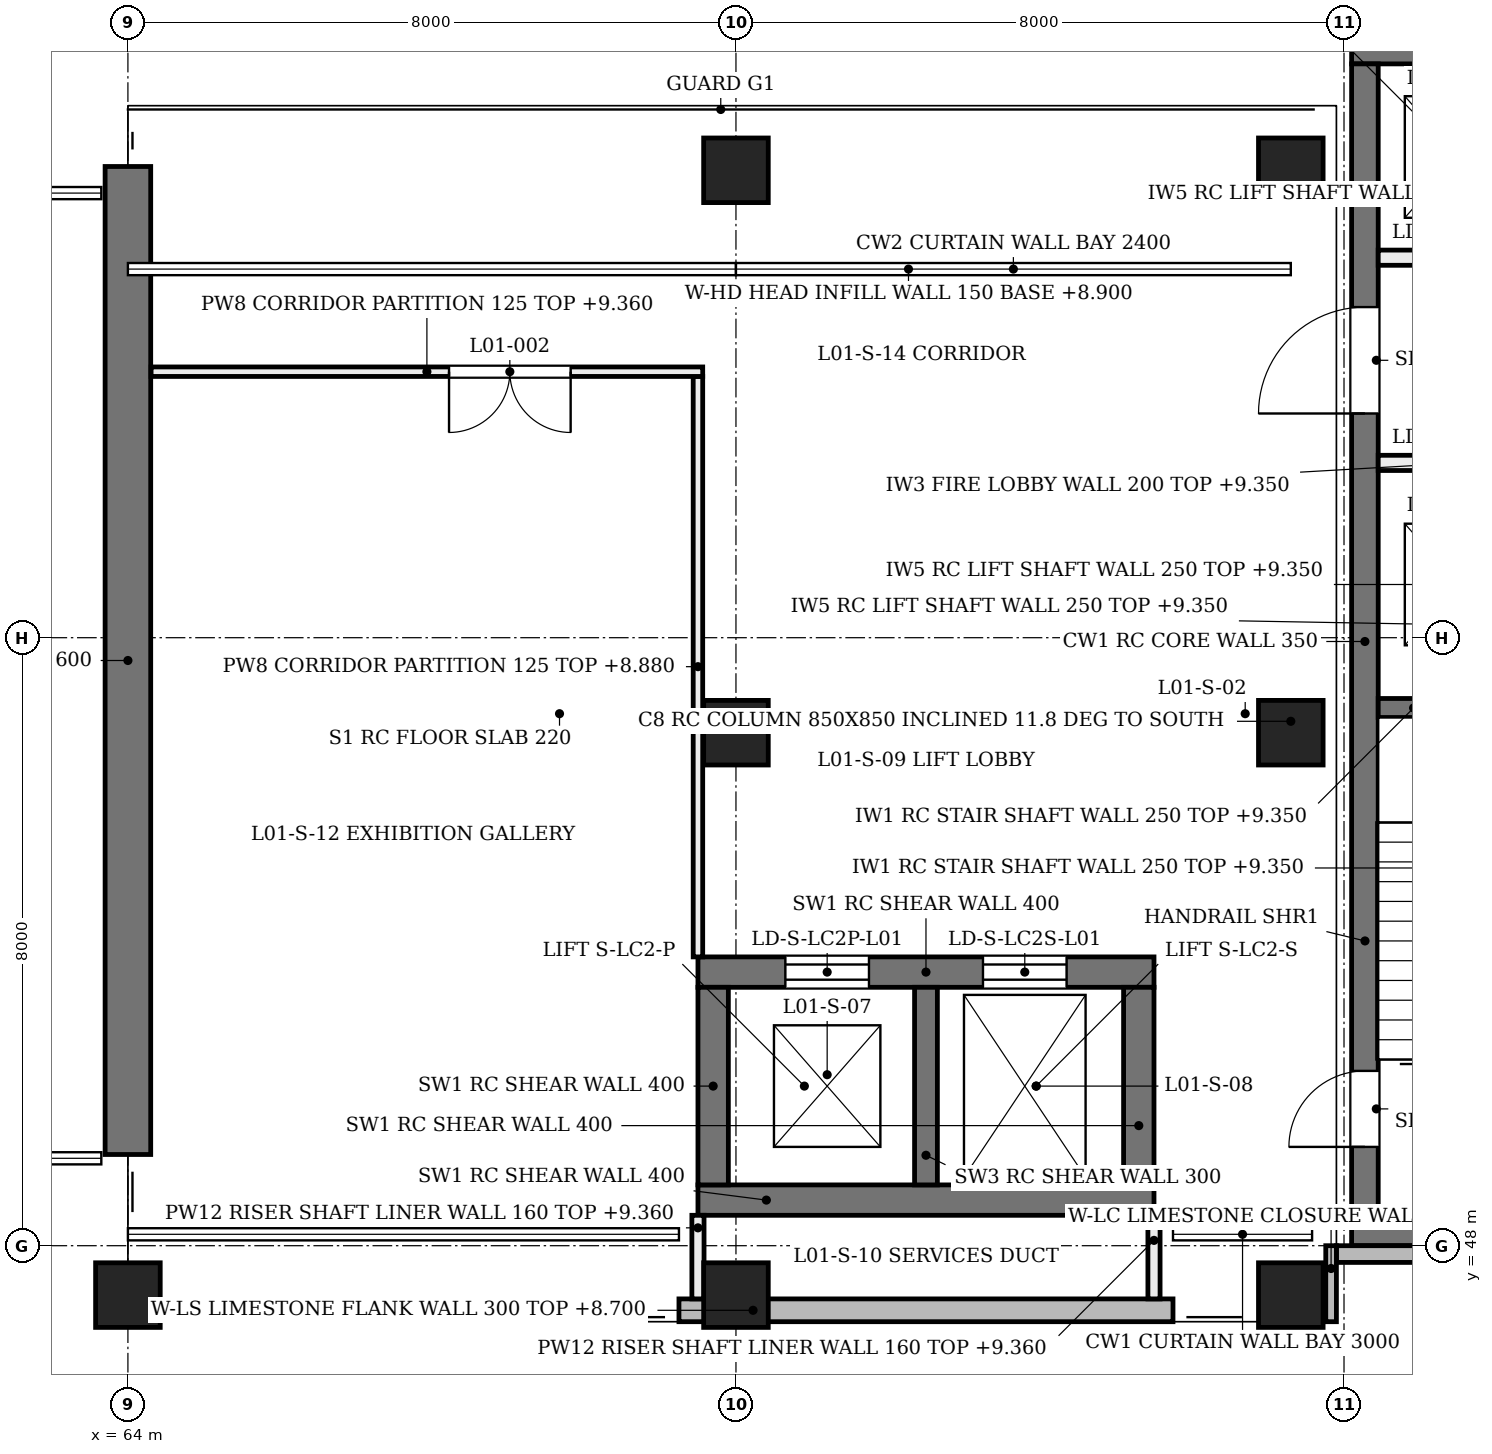
"""IFC4 building model, lengths in metres.
Left out: names, types, materials, properties, quantities, classifications, styles, units other than length and angle.
Written with IfcOpenShell. Run it as: python <this file> out.ifc"""

import sys

from ifc_helpers import new_model, si_unit, direction, frame, frame_2d, origin, origin_2d, place, context, subcontext, project, spatial, rectangle, extrude, element, fill, save


model = new_model("IFC4")
c1 = context("Model", 3, precision=1e-05, world=origin(), true_north=direction((0.0, 1.0)))
c2 = subcontext(c1, "Body", "Model", "MODEL_VIEW")
j1 = project(units=[si_unit("LENGTHUNIT", "METRE"), si_unit("PLANEANGLEUNIT", "RADIAN")], contexts=[c1])
p1 = place(None, origin())
s1 = spatial("IfcSite", under=j1, at=p1, CompositionType="ELEMENT")
p2 = place(p1, origin())
s2 = spatial("IfcBuilding", under=s1, at=p2, CompositionType="ELEMENT")
p3 = place(p2, frame((0.0, 0.0, 4.8)))
s3 = spatial("IfcBuildingStorey", under=s2, at=p3, CompositionType="ELEMENT", Elevation=4.8)
p4 = place(p3, frame((71.5, 48.6, 0.0), z_axis=(0.0, 0.0, 1.0), x_axis=(1.0, 0.0, 0.0)))
e1 = element("IfcWall", 1, at=p4, inside=s3, PredefinedType="SHEAR", context=c2, shape_type="SweptSolid", body=[
    extrude(rectangle(XDim=6.0, YDim=0.4, at=frame_2d((3.0, 0.0))), origin(), (0.0, 0.0, 1.0), 4.58),
])
p5 = place(p3, frame((71.5, 51.6, 0.0), z_axis=(0.0, 0.0, 1.0), x_axis=(1.0, 0.0, 0.0)))
e2 = element("IfcWall", 2, at=p5, inside=s3, PredefinedType="SHEAR", context=c2, shape_type="SweptSolid", body=[
    extrude(rectangle(XDim=6.0, YDim=0.4, at=frame_2d((3.0, 0.0))), origin(), (0.0, 0.0, 1.0), 4.58),
])
p6 = place(p5, frame((1.15, 0.0, 0.0)))
e3 = element("IfcOpeningElement", 3, at=p6, cuts=e2, PredefinedType="OPENING", context=c2, shape_type="SweptSolid", body=[
    extrude(rectangle(XDim=1.1, YDim=2.1, at=frame_2d((0.55, 1.05))), frame((0.0, 0.21, 0.0), z_axis=(0.0, -1.0, 0.0), x_axis=(1.0, 0.0, 0.0)), (0.0, 0.0, 1.0), 0.42),
])
p7 = place(p5, frame((3.75, 0.0, 0.0)))
e4 = element("IfcOpeningElement", 4, at=p7, cuts=e2, PredefinedType="OPENING", context=c2, shape_type="SweptSolid", body=[
    extrude(rectangle(XDim=1.1, YDim=2.1, at=frame_2d((0.55, 1.05))), frame((0.0, 0.21, 0.0), z_axis=(0.0, -1.0, 0.0), x_axis=(1.0, 0.0, 0.0)), (0.0, 0.0, 1.0), 0.42),
])
for number, where, z_axis, x_axis in (
    (5, (71.7, 48.8, 0.0), (0.0, 0.0, 1.0), (0.0, 1.0, 0.0)),
    (6, (77.3, 48.8, 0.0), (0.0, 0.0, 1.0), (0.0, 1.0, 0.0)),
):
    element("IfcWall", number, at=place(p3, frame(where, z_axis=z_axis, x_axis=x_axis)), inside=s3, PredefinedType="SHEAR", context=c2, shape_type="SweptSolid", body=[
        extrude(rectangle(XDim=2.6, YDim=0.4, at=frame_2d((1.3, 0.0))), origin(), (0.0, 0.0, 1.0), 4.58),
    ])
p8 = place(p3, frame((74.5, 48.8, 0.0), z_axis=(0.0, 0.0, 1.0), x_axis=(0.0, 1.0, 0.0)))
e7 = element("IfcWall", 7, at=p8, inside=s3, PredefinedType="SHEAR", context=c2, shape_type="SweptSolid", body=[
    extrude(rectangle(XDim=2.6, YDim=0.3, at=frame_2d((1.3, 0.0))), origin(), (0.0, 0.0, 1.0), 4.58),
])
p9 = place(p3, frame((64.0, 49.2, 0.0), z_axis=(0.0, 0.0, 1.0), x_axis=(0.0, 1.0, 0.0)))
e8 = element("IfcWall", 8, at=p9, inside=s3, PredefinedType="SHEAR", context=c2, shape_type="SweptSolid", body=[
    extrude(rectangle(XDim=13.0, YDim=0.6, at=frame_2d((6.5, 0.0))), origin(), (0.0, 0.0, 1.0), 4.58),
])
for number, where, z_axis, x_axis in (
    (9, (80.1, 48.175, 0.0), (0.0, 0.0, 1.0), (1.0, 0.0, 0.0)),
    (10, (80.1, 63.725, 0.0), (0.0, 0.0, 1.0), (1.0, 0.0, 0.0)),
):
    element("IfcWall", number, at=place(p3, frame(where, z_axis=z_axis, x_axis=x_axis)), inside=s3, PredefinedType="SHEAR", context=c2, shape_type="SweptSolid", body=[
        extrude(rectangle(XDim=7.9, YDim=0.35, at=frame_2d((3.95, 0.0))), origin(), (0.0, 0.0, 1.0), 4.58),
    ])
p10 = place(p3, frame((80.275, 48.35, 0.0), z_axis=(0.0, 0.0, 1.0), x_axis=(0.0, 1.0, 0.0)))
e11 = element("IfcWall", 11, at=p10, inside=s3, PredefinedType="SHEAR", context=c2, shape_type="SweptSolid", body=[
    extrude(rectangle(XDim=15.2, YDim=0.35, at=frame_2d((7.6, 0.0))), origin(), (0.0, 0.0, 1.0), 4.58),
])
p11 = place(p10, frame((0.95, 0.0, 0.0)))
e12 = element("IfcOpeningElement", 12, at=p11, cuts=e11, PredefinedType="OPENING", context=c2, shape_type="SweptSolid", body=[
    extrude(rectangle(XDim=1.0, YDim=2.1, at=frame_2d((0.5, 1.05))), frame((0.0, 0.185, 0.0), z_axis=(0.0, -1.0, 0.0), x_axis=(1.0, 0.0, 0.0)), (0.0, 0.0, 1.0), 0.37),
])
p12 = place(p10, frame((10.6, 0.0, 0.0)))
e13 = element("IfcOpeningElement", 13, at=p12, cuts=e11, PredefinedType="OPENING", context=c2, shape_type="SweptSolid", body=[
    extrude(rectangle(XDim=1.4, YDim=2.1, at=frame_2d((0.7, 1.05))), frame((0.0, 0.185, 0.0), z_axis=(0.0, -1.0, 0.0), x_axis=(1.0, 0.0, 0.0)), (0.0, 0.0, 1.0), 0.37),
])
for number, where, z_axis, x_axis in (
    (14, (64.0, 47.6, 0.0), (0.0, -0.204, 0.979), (1.0, 0.0, 0.0)),
    (15, (72.0, 47.6, 0.0), (0.0, -0.204, 0.979), (1.0, 0.0, 0.0)),
    (16, (79.3, 47.6, 0.0), (0.0, -0.204, 0.979), (1.0, 0.0, 0.0)),
    (17, (72.0, 55.0, 0.0), (0.0, -0.204, 0.979), (1.0, 0.0, 0.0)),
    (18, (79.3, 55.0, 0.0), (0.0, -0.204, 0.979), (1.0, 0.0, 0.0)),
    (19, (72.0, 62.4, 0.0), (0.0, -0.204, 0.979), (1.0, 0.0, 0.0)),
    (20, (79.3, 62.4, 0.0), (0.0, -0.204, 0.979), (1.0, 0.0, 0.0)),
):
    element("IfcColumn", number, at=place(p3, frame(where, z_axis=z_axis, x_axis=x_axis)), inside=s3, PredefinedType="COLUMN", context=c2, shape_type="SweptSolid", body=[
        extrude(rectangle(XDim=0.85, YDim=0.85, at=origin_2d()), origin(), (0.0, 0.0, 1.0), 4.903),
    ])
p13 = place(p3, frame((71.25, 47.15, 0.0), z_axis=(0.0, 0.0, 1.0), x_axis=(1.0, 0.0, 0.0)))
e21 = element("IfcWall", 21, at=p13, inside=s3, PredefinedType="SOLIDWALL", context=c2, shape_type="SweptSolid", body=[
    extrude(rectangle(XDim=6.5, YDim=0.3, at=frame_2d((3.25, 0.0))), origin(), (0.0, 0.0, 1.0), 3.9),
])
p14 = place(p3, frame((72.2, 60.85, 4.1), z_axis=(0.0, 0.0, 1.0), x_axis=(1.0, 0.0, 0.0)))
e22 = element("IfcWall", 22, at=p14, inside=s3, PredefinedType="SOLIDWALL", context=c2, shape_type="SweptSolid", body=[
    extrude(rectangle(XDim=6.9, YDim=0.15, at=frame_2d((3.45, 0.0))), origin(), (0.0, 0.0, 1.0), 0.48),
])
p15 = place(p3, frame((79.9, 47.89, 0.0), z_axis=(0.0, 0.0, 1.0), x_axis=(1.0, 0.0, 0.0)))
e23 = element("IfcWall", 23, at=p15, inside=s3, PredefinedType="SOLIDWALL", context=c2, shape_type="SweptSolid", body=[
    extrude(rectangle(XDim=8.2, YDim=0.22, at=frame_2d((4.1, 0.0))), origin(), (0.0, 0.0, 1.0), 3.9),
])
p16 = place(p15, frame((1.308, 0.0, 0.9)))
e24 = element("IfcOpeningElement", 24, at=p16, cuts=e23, PredefinedType="OPENING", context=c2, shape_type="SweptSolid", body=[
    extrude(rectangle(XDim=0.45, YDim=2.6, at=frame_2d((0.225, 1.3))), frame((0.0, 0.12, 0.0), z_axis=(0.0, -1.0, 0.0), x_axis=(1.0, 0.0, 0.0)), (0.0, 0.0, 1.0), 0.24),
])
p17 = place(p15, frame((3.975, 0.0, 0.9)))
e25 = element("IfcOpeningElement", 25, at=p17, cuts=e23, PredefinedType="OPENING", context=c2, shape_type="SweptSolid", body=[
    extrude(rectangle(XDim=0.45, YDim=2.6, at=frame_2d((0.225, 1.3))), frame((0.0, 0.12, 0.0), z_axis=(0.0, -1.0, 0.0), x_axis=(1.0, 0.0, 0.0)), (0.0, 0.0, 1.0), 0.24),
])
p18 = place(p15, frame((6.642, 0.0, 0.9)))
e26 = element("IfcOpeningElement", 26, at=p18, cuts=e23, PredefinedType="OPENING", context=c2, shape_type="SweptSolid", body=[
    extrude(rectangle(XDim=0.45, YDim=2.6, at=frame_2d((0.225, 1.3))), frame((0.0, 0.12, 0.0), z_axis=(0.0, -1.0, 0.0), x_axis=(1.0, 0.0, 0.0)), (0.0, 0.0, 1.0), 0.24),
])
p19 = place(p3, frame((79.83, 47.0, 0.0), z_axis=(0.0, 0.0, 1.0), x_axis=(0.0, 1.0, 0.0)))
e27 = element("IfcWall", 27, at=p19, inside=s3, PredefinedType="SOLIDWALL", context=c2, shape_type="SweptSolid", body=[
    extrude(rectangle(XDim=1.0, YDim=0.14, at=frame_2d((0.5, 0.0))), origin(), (0.0, 0.0, 1.0), 3.9),
])
p20 = place(p3, frame((83.55, 55.075, 0.0), z_axis=(0.0, 0.0, 1.0), x_axis=(-1.0, 0.0, 0.0)))
e28 = element("IfcWall", 28, at=p20, inside=s3, PredefinedType="SOLIDWALL", context=c2, shape_type="SweptSolid", body=[
    extrude(rectangle(XDim=3.1, YDim=0.25, at=frame_2d((1.55, 0.0))), origin(), (0.0, 0.0, 1.0), 4.55),
])
p21 = place(p3, frame((87.65, 58.3, 0.0), z_axis=(0.0, 0.0, 1.0), x_axis=(-1.0, 0.0, 0.0)))
e29 = element("IfcWall", 29, at=p21, inside=s3, PredefinedType="SOLIDWALL", context=c2, shape_type="SweptSolid", body=[
    extrude(rectangle(XDim=7.2, YDim=0.2, at=frame_2d((3.6, 0.0))), origin(), (0.0, 0.0, 1.0), 4.55),
])
p22 = place(p21, frame((0.5, 0.0, 0.0)))
e30 = element("IfcOpeningElement", 30, at=p22, cuts=e29, PredefinedType="OPENING", context=c2, shape_type="SweptSolid", body=[
    extrude(rectangle(XDim=1.1, YDim=2.1, at=frame_2d((0.55, 1.05))), frame((0.0, 0.11, 0.0), z_axis=(0.0, -1.0, 0.0), x_axis=(1.0, 0.0, 0.0)), (0.0, 0.0, 1.0), 0.22),
])
p23 = place(p21, frame((5.6, 0.0, 0.0)))
e31 = element("IfcOpeningElement", 31, at=p23, cuts=e29, PredefinedType="OPENING", context=c2, shape_type="SweptSolid", body=[
    extrude(rectangle(XDim=1.1, YDim=2.1, at=frame_2d((0.55, 1.05))), frame((0.0, 0.11, 0.0), z_axis=(0.0, -1.0, 0.0), x_axis=(1.0, 0.0, 0.0)), (0.0, 0.0, 1.0), 0.22),
])
p24 = place(p21, frame((3.1, 0.0, 0.0)))
e32 = element("IfcOpeningElement", 32, at=p24, cuts=e29, PredefinedType="OPENING", context=c2, shape_type="SweptSolid", body=[
    extrude(rectangle(XDim=1.0, YDim=2.1, at=frame_2d((0.5, 1.05))), frame((0.0, 0.11, 0.0), z_axis=(0.0, -1.0, 0.0), x_axis=(1.0, 0.0, 0.0)), (0.0, 0.0, 1.0), 0.22),
])
p25 = place(p3, frame((87.65, 61.0, 0.0), z_axis=(0.0, 0.0, 1.0), x_axis=(-1.0, 0.0, 0.0)))
e33 = element("IfcWall", 33, at=p25, inside=s3, PredefinedType="SOLIDWALL", context=c2, shape_type="SweptSolid", body=[
    extrude(rectangle(XDim=7.2, YDim=0.2, at=frame_2d((3.6, 0.0))), origin(), (0.0, 0.0, 1.0), 4.55),
])
p26 = place(p25, frame((0.5, 0.0, 0.0)))
e34 = element("IfcOpeningElement", 34, at=p26, cuts=e33, PredefinedType="OPENING", context=c2, shape_type="SweptSolid", body=[
    extrude(rectangle(XDim=1.1, YDim=2.1, at=frame_2d((0.55, 1.05))), frame((0.0, 0.11, 0.0), z_axis=(0.0, -1.0, 0.0), x_axis=(1.0, 0.0, 0.0)), (0.0, 0.0, 1.0), 0.22),
])
p27 = place(p25, frame((5.6, 0.0, 0.0)))
e35 = element("IfcOpeningElement", 35, at=p27, cuts=e33, PredefinedType="OPENING", context=c2, shape_type="SweptSolid", body=[
    extrude(rectangle(XDim=1.1, YDim=2.1, at=frame_2d((0.55, 1.05))), frame((0.0, 0.11, 0.0), z_axis=(0.0, -1.0, 0.0), x_axis=(1.0, 0.0, 0.0)), (0.0, 0.0, 1.0), 0.22),
])
p28 = place(p25, frame((3.1, 0.0, 0.0)))
e36 = element("IfcOpeningElement", 36, at=p28, cuts=e33, PredefinedType="OPENING", context=c2, shape_type="SweptSolid", body=[
    extrude(rectangle(XDim=1.0, YDim=2.1, at=frame_2d((0.5, 1.05))), frame((0.0, 0.11, 0.0), z_axis=(0.0, -1.0, 0.0), x_axis=(1.0, 0.0, 0.0)), (0.0, 0.0, 1.0), 0.22),
])
for number, where, z_axis, x_axis in (
    (37, (77.5, 47.3, 0.0), (0.0, 0.0, 1.0), (0.0, 1.0, 0.0)),
    (38, (71.5, 47.3, 0.0), (0.0, 0.0, 1.0), (0.0, 1.0, 0.0)),
):
    element("IfcWall", number, at=place(p3, frame(where, z_axis=z_axis, x_axis=x_axis)), inside=s3, PredefinedType="PARTITIONING", context=c2, shape_type="SweptSolid", body=[
        extrude(rectangle(XDim=1.1, YDim=0.16, at=frame_2d((0.55, 0.0))), origin(), (0.0, 0.0, 1.0), 4.56),
    ])
p29 = place(p3, frame((71.5, 51.8, 0.0), z_axis=(0.0, 0.0, 1.0), x_axis=(0.0, 1.0, 0.0)))
e39 = element("IfcWall", 39, at=p29, inside=s3, PredefinedType="PARTITIONING", context=c2, shape_type="SweptSolid", body=[
    extrude(rectangle(XDim=7.637, YDim=0.125, at=frame_2d((3.819, 0.0))), origin(), (0.0, 0.0, 1.0), 4.08),
])
p30 = place(p3, frame((64.305, 59.5, 0.0), z_axis=(0.0, 0.0, 1.0), x_axis=(1.0, 0.0, 0.0)))
e40 = element("IfcWall", 40, at=p30, inside=s3, PredefinedType="PARTITIONING", context=c2, shape_type="SweptSolid", body=[
    extrude(rectangle(XDim=7.258, YDim=0.125, at=frame_2d((3.629, 0.0))), origin(), (0.0, 0.0, 1.0), 4.56),
])
p31 = place(p30, frame((3.92, 0.0, 0.0)))
e41 = element("IfcOpeningElement", 41, at=p31, cuts=e40, PredefinedType="OPENING", context=c2, shape_type="SweptSolid", body=[
    extrude(rectangle(XDim=1.6, YDim=2.2, at=frame_2d((0.8, 1.1))), frame((0.0, 0.073, 0.0), z_axis=(0.0, -1.0, 0.0), x_axis=(1.0, 0.0, 0.0)), (0.0, 0.0, 1.0), 0.145),
])
p32 = place(p11, origin())
e42 = element("IfcDoor", 42, at=p32, inside=s3, OperationType="SINGLE_SWING_LEFT", PredefinedType="DOOR", context=c2, shape_type="SweptSolid", body=[
    extrude(rectangle(XDim=1.0, YDim=2.1, at=frame_2d((0.5, 1.05))), frame((0.0, 0.025, 0.0), z_axis=(0.0, -1.0, 0.0), x_axis=(1.0, 0.0, 0.0)), (0.0, 0.0, 1.0), 0.05),
])
fill(e12, e42)
p33 = place(p12, origin())
e43 = element("IfcDoor", 43, at=p33, inside=s3, OperationType="SINGLE_SWING_LEFT", PredefinedType="DOOR", context=c2, shape_type="SweptSolid", body=[
    extrude(rectangle(XDim=1.4, YDim=2.1, at=frame_2d((0.7, 1.05))), frame((0.0, 0.025, 0.0), z_axis=(0.0, -1.0, 0.0), x_axis=(1.0, 0.0, 0.0)), (0.0, 0.0, 1.0), 0.05),
])
fill(e13, e43)
p34 = place(p6, origin())
e44 = element("IfcDoor", 44, at=p34, inside=s3, OperationType="DOUBLE_DOOR_SLIDING", PredefinedType="DOOR", context=c2, shape_type="SweptSolid", body=[
    extrude(rectangle(XDim=1.1, YDim=2.1, at=frame_2d((0.55, 1.05))), frame((0.0, 0.025, 0.0), z_axis=(0.0, -1.0, 0.0), x_axis=(1.0, 0.0, 0.0)), (0.0, 0.0, 1.0), 0.05),
])
fill(e3, e44)
p35 = place(p7, origin())
e45 = element("IfcDoor", 45, at=p35, inside=s3, OperationType="DOUBLE_DOOR_SLIDING", PredefinedType="DOOR", context=c2, shape_type="SweptSolid", body=[
    extrude(rectangle(XDim=1.1, YDim=2.1, at=frame_2d((0.55, 1.05))), frame((0.0, 0.025, 0.0), z_axis=(0.0, -1.0, 0.0), x_axis=(1.0, 0.0, 0.0)), (0.0, 0.0, 1.0), 0.05),
])
fill(e4, e45)
p36 = place(p31, frame((1.6, 0.0, 0.0), z_axis=(0.0, 0.0, 1.0), x_axis=(-1.0, 0.0, 0.0)))
e46 = element("IfcDoor", 46, at=p36, inside=s3, OperationType="DOUBLE_DOOR_SINGLE_SWING", PredefinedType="DOOR", context=c2, shape_type="SweptSolid", body=[
    extrude(rectangle(XDim=1.6, YDim=2.2, at=frame_2d((0.8, 1.1))), frame((0.0, 0.025, 0.0), z_axis=(0.0, -1.0, 0.0), x_axis=(1.0, 0.0, 0.0)), (0.0, 0.0, 1.0), 0.05),
])
fill(e41, e46)
save(model, sys.argv[1])
